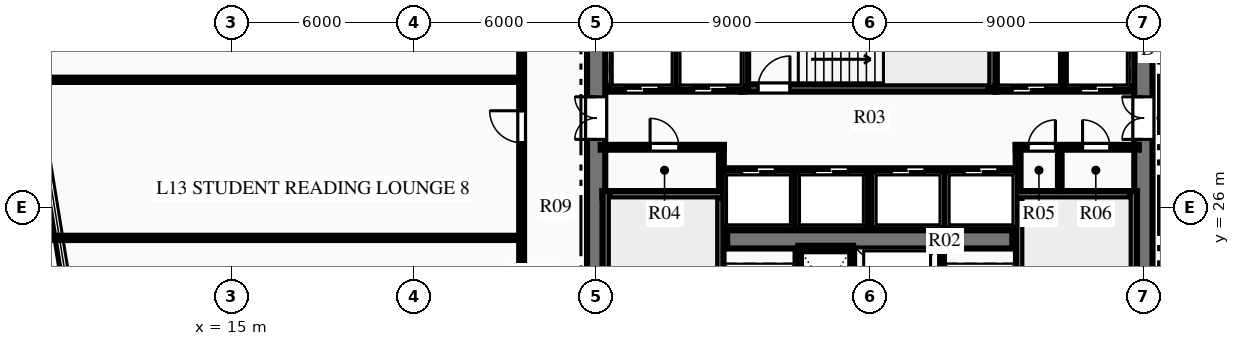
"""IFC4 building model, lengths in metres.
Left out: names, types, materials, properties, quantities, classifications, styles, units other than length and angle.
Written with IfcOpenShell. Run it as: python <this file> out.ifc"""

import sys

from ifc_helpers import new_model, si_unit, direction, frame, frame_2d, origin, place, context, subcontext, project, spatial, rectangle, extrude, element, fill, save


model = new_model("IFC4")
c1 = context("Model", 3, precision=1e-05, world=origin(), true_north=direction((0.0, 1.0)))
c2 = subcontext(c1, "Body", "Model", "MODEL_VIEW")
j1 = project(units=[si_unit("LENGTHUNIT", "METRE"), si_unit("PLANEANGLEUNIT", "RADIAN")], contexts=[c1])
p1 = place(None, origin())
s1 = spatial("IfcSite", under=j1, at=p1, CompositionType="ELEMENT")
p2 = place(p1, origin())
s2 = spatial("IfcBuilding", under=s1, at=p2, CompositionType="ELEMENT")
p3 = place(p2, frame((0.0, 0.0, 58.95)))
s3 = spatial("IfcBuildingStorey", under=s2, at=p3, CompositionType="ELEMENT", Elevation=58.95)
p4 = place(p3, frame((27.0, 18.3, 0.0), z_axis=(0.0, 0.0, 1.0), x_axis=(0.0, 1.0, 0.0)))
e1 = element("IfcWall", 1, at=p4, inside=s3, PredefinedType="SHEAR", context=c2, shape_type="SweptSolid", body=[
    extrude(rectangle(XDim=15.4, YDim=0.6, at=frame_2d((7.7, 0.0))), origin(), (0.0, 0.0, 1.0), 3.75),
])
p5 = place(p4, frame((9.94, 0.0, 0.0)))
e2 = element("IfcOpeningElement", 2, at=p5, cuts=e1, PredefinedType="OPENING", context=c2, shape_type="SweptSolid", body=[
    extrude(rectangle(XDim=1.4, YDim=2.2, at=frame_2d((0.7, 1.1))), frame((0.0, 0.31, 0.0), z_axis=(0.0, -1.0, 0.0), x_axis=(1.0, 0.0, 0.0)), (0.0, 0.0, 1.0), 0.62),
])
p6 = place(p3, frame((45.0, 18.3, 0.0), z_axis=(0.0, 0.0, 1.0), x_axis=(0.0, 1.0, 0.0)))
e3 = element("IfcWall", 3, at=p6, inside=s3, PredefinedType="SHEAR", context=c2, shape_type="SweptSolid", body=[
    extrude(rectangle(XDim=15.4, YDim=0.6, at=frame_2d((7.7, 0.0))), origin(), (0.0, 0.0, 1.0), 3.75),
])
p7 = place(p6, frame((9.94, 0.0, 0.0)))
e4 = element("IfcOpeningElement", 4, at=p7, cuts=e3, PredefinedType="OPENING", context=c2, shape_type="SweptSolid", body=[
    extrude(rectangle(XDim=1.4, YDim=2.2, at=frame_2d((0.7, 1.1))), frame((0.0, 0.31, 0.0), z_axis=(0.0, -1.0, 0.0), x_axis=(1.0, 0.0, 0.0)), (0.0, 0.0, 1.0), 0.62),
])
p8 = place(p3, frame((31.31, 24.95, 0.0), z_axis=(0.0, 0.0, 1.0), x_axis=(1.0, 0.0, 0.0)))
e5 = element("IfcWall", 5, at=p8, inside=s3, PredefinedType="SHEAR", context=c2, shape_type="SweptSolid", body=[
    extrude(rectangle(XDim=9.38, YDim=0.6, at=frame_2d((4.69, 0.0))), origin(), (0.0, 0.0, 1.0), 3.75),
])
p9 = place(p3, frame((31.07, 18.28, 0.0), z_axis=(0.0, 0.0, 1.0), x_axis=(0.0, 1.0, 0.0)))
e6 = element("IfcWall", 6, at=p9, inside=s3, PredefinedType="SHEAR", context=c2, shape_type="SweptSolid", body=[
    extrude(rectangle(XDim=8.26, YDim=0.24, at=frame_2d((4.13, 0.0))), origin(), (0.0, 0.0, 1.0), 3.75),
])
p10 = place(p9, frame((0.365, 0.0, 0.0)))
e7 = element("IfcOpeningElement", 7, at=p10, cuts=e6, PredefinedType="OPENING", context=c2, shape_type="SweptSolid", body=[
    extrude(rectangle(XDim=1.05, YDim=2.15, at=frame_2d((0.525, 1.075))), frame((0.0, 0.13, 0.0), z_axis=(0.0, -1.0, 0.0), x_axis=(1.0, 0.0, 0.0)), (0.0, 0.0, 1.0), 0.26),
])
p11 = place(p3, frame((27.21, 26.42, 0.0), z_axis=(0.0, 0.0, 1.0), x_axis=(1.0, 0.0, 0.0)))
e8 = element("IfcWall", 8, at=p11, inside=s3, PredefinedType="SHEAR", context=c2, shape_type="SweptSolid", body=[
    extrude(rectangle(XDim=3.98, YDim=0.24, at=frame_2d((1.99, 0.0))), origin(), (0.0, 0.0, 1.0), 3.75),
])
p12 = place(p3, frame((27.33, 18.28, 0.0), z_axis=(0.0, 0.0, 1.0), x_axis=(0.0, 1.0, 0.0)))
e9 = element("IfcWall", 9, at=p12, inside=s3, PredefinedType="SHEAR", context=c2, shape_type="SweptSolid", body=[
    extrude(rectangle(XDim=8.26, YDim=0.24, at=frame_2d((4.13, 0.0))), origin(), (0.0, 0.0, 1.0), 3.75),
])
p13 = place(p3, frame((40.93, 18.28, 0.0), z_axis=(0.0, 0.0, 1.0), x_axis=(0.0, 1.0, 0.0)))
e10 = element("IfcWall", 10, at=p13, inside=s3, PredefinedType="SHEAR", context=c2, shape_type="SweptSolid", body=[
    extrude(rectangle(XDim=8.26, YDim=0.24, at=frame_2d((4.13, 0.0))), origin(), (0.0, 0.0, 1.0), 3.75),
])
p14 = place(p13, frame((0.365, 0.0, 0.0)))
e11 = element("IfcOpeningElement", 11, at=p14, cuts=e10, PredefinedType="OPENING", context=c2, shape_type="SweptSolid", body=[
    extrude(rectangle(XDim=1.05, YDim=2.15, at=frame_2d((0.525, 1.075))), frame((0.0, 0.13, 0.0), z_axis=(0.0, -1.0, 0.0), x_axis=(1.0, 0.0, 0.0)), (0.0, 0.0, 1.0), 0.26),
])
p15 = place(p3, frame((40.81, 26.42, 0.0), z_axis=(0.0, 0.0, 1.0), x_axis=(1.0, 0.0, 0.0)))
e12 = element("IfcWall", 12, at=p15, inside=s3, PredefinedType="SHEAR", context=c2, shape_type="SweptSolid", body=[
    extrude(rectangle(XDim=3.98, YDim=0.24, at=frame_2d((1.99, 0.0))), origin(), (0.0, 0.0, 1.0), 3.75),
])
p16 = place(p3, frame((44.67, 18.28, 0.0), z_axis=(0.0, 0.0, 1.0), x_axis=(0.0, 1.0, 0.0)))
e13 = element("IfcWall", 13, at=p16, inside=s3, PredefinedType="SHEAR", context=c2, shape_type="SweptSolid", body=[
    extrude(rectangle(XDim=8.26, YDim=0.24, at=frame_2d((4.13, 0.0))), origin(), (0.0, 0.0, 1.0), 3.75),
])
p17 = place(p3, frame((31.76, 29.93, 0.0), z_axis=(0.0, 0.0, 1.0), x_axis=(1.0, 0.0, 0.0)))
e14 = element("IfcWall", 14, at=p17, inside=s3, PredefinedType="SHEAR", context=c2, shape_type="SweptSolid", body=[
    extrude(rectangle(XDim=8.38, YDim=0.24, at=frame_2d((4.19, 0.0))), origin(), (0.0, 0.0, 1.0), 3.75),
])
p18 = place(p17, frame((0.565, 0.0, 0.0)))
e15 = element("IfcOpeningElement", 15, at=p18, cuts=e14, PredefinedType="OPENING", context=c2, shape_type="SweptSolid", body=[
    extrude(rectangle(XDim=1.05, YDim=2.15, at=frame_2d((0.525, 1.075))), frame((0.0, 0.13, 0.0), z_axis=(0.0, -1.0, 0.0), x_axis=(1.0, 0.0, 0.0)), (0.0, 0.0, 1.0), 0.26),
])
p19 = place(p3, frame((31.88, 29.93, 0.0), z_axis=(0.0, 0.0, 1.0), x_axis=(0.0, 1.0, 0.0)))
e16 = element("IfcWall", 16, at=p19, inside=s3, PredefinedType="SHEAR", context=c2, shape_type="SweptSolid", body=[
    extrude(rectangle(XDim=3.79, YDim=0.24, at=frame_2d((1.895, 0.0))), origin(), (0.0, 0.0, 1.0), 3.75),
])
p20 = place(p3, frame((40.02, 29.93, 0.0), z_axis=(0.0, 0.0, 1.0), x_axis=(0.0, 1.0, 0.0)))
e17 = element("IfcWall", 17, at=p20, inside=s3, PredefinedType="SHEAR", context=c2, shape_type="SweptSolid", body=[
    extrude(rectangle(XDim=3.85, YDim=0.24, at=frame_2d((1.925, 0.0))), origin(), (0.0, 0.0, 1.0), 3.75),
])
for number, where, z_axis, x_axis in (
    (18, (33.65, 22.05, 0.0), (0.0, 0.0, 1.0), (0.0, 1.0, 0.0)),
    (19, (35.45, 22.05, 0.0), (0.0, 0.0, 1.0), (0.0, 1.0, 0.0)),
):
    element("IfcWall", number, at=place(p3, frame(where, z_axis=z_axis, x_axis=x_axis)), inside=s3, PredefinedType="PARTITIONING", context=c2, shape_type="SweptSolid", body=[
        extrude(rectangle(XDim=2.6, YDim=0.18, at=frame_2d((1.3, 0.0))), origin(), (0.0, 0.0, 1.0), 3.44),
    ])
p21 = place(p3, frame((33.65, 24.65, 0.0), z_axis=(0.0, 0.0, 1.0), x_axis=(1.0, 0.0, 0.0)))
e20 = element("IfcWall", 20, at=p21, inside=s3, PredefinedType="PARTITIONING", context=c2, shape_type="SweptSolid", body=[
    extrude(rectangle(XDim=1.8, YDim=0.18, at=frame_2d((0.9, 0.0))), origin(), (0.0, 0.0, 1.0), 3.44),
])
p22 = place(p3, frame((38.35, 22.05, 0.0), z_axis=(0.0, 0.0, 1.0), x_axis=(0.0, 1.0, 0.0)))
e21 = element("IfcWall", 21, at=p22, inside=s3, PredefinedType="PARTITIONING", context=c2, shape_type="SweptSolid", body=[
    extrude(rectangle(XDim=2.6, YDim=0.18, at=frame_2d((1.3, 0.0))), origin(), (0.0, 0.0, 1.0), 3.44),
])
p23 = place(p3, frame((27.15, 27.98, 0.0), z_axis=(0.0, 0.0, 1.0), x_axis=(1.0, 0.0, 0.0)))
e22 = element("IfcWall", 22, at=p23, inside=s3, PredefinedType="PARTITIONING", context=c2, shape_type="SweptSolid", body=[
    extrude(rectangle(XDim=4.05, YDim=0.16, at=frame_2d((2.025, 0.0))), origin(), (0.0, 0.0, 1.0), 3.44),
])
p24 = place(p23, frame((1.625, 0.0, 0.0)))
e23 = element("IfcOpeningElement", 23, at=p24, cuts=e22, PredefinedType="OPENING", context=c2, shape_type="SweptSolid", body=[
    extrude(rectangle(XDim=0.95, YDim=2.15, at=frame_2d((0.475, 1.075))), frame((0.0, 0.09, 0.0), z_axis=(0.0, -1.0, 0.0), x_axis=(1.0, 0.0, 0.0)), (0.0, 0.0, 1.0), 0.18),
])
p25 = place(p3, frame((31.12, 26.54, 0.0), z_axis=(0.0, 0.0, 1.0), x_axis=(0.0, 1.0, 0.0)))
e24 = element("IfcWall", 24, at=p25, inside=s3, PredefinedType="PARTITIONING", context=c2, shape_type="SweptSolid", body=[
    extrude(rectangle(XDim=1.51, YDim=0.16, at=frame_2d((0.755, 0.0))), origin(), (0.0, 0.0, 1.0), 3.44),
])
p26 = place(p3, frame((40.8, 27.98, 0.0), z_axis=(0.0, 0.0, 1.0), x_axis=(1.0, 0.0, 0.0)))
e25 = element("IfcWall", 25, at=p26, inside=s3, PredefinedType="PARTITIONING", context=c2, shape_type="SweptSolid", body=[
    extrude(rectangle(XDim=4.05, YDim=0.16, at=frame_2d((2.025, 0.0))), origin(), (0.0, 0.0, 1.0), 3.44),
])
p27 = place(p26, frame((0.407, 0.0, 0.0)))
e26 = element("IfcOpeningElement", 26, at=p27, cuts=e25, PredefinedType="OPENING", context=c2, shape_type="SweptSolid", body=[
    extrude(rectangle(XDim=0.9, YDim=2.15, at=frame_2d((0.45, 1.075))), frame((0.0, 0.09, 0.0), z_axis=(0.0, -1.0, 0.0), x_axis=(1.0, 0.0, 0.0)), (0.0, 0.0, 1.0), 0.18),
])
p28 = place(p26, frame((2.2, 0.0, 0.0)))
e27 = element("IfcOpeningElement", 27, at=p28, cuts=e25, PredefinedType="OPENING", context=c2, shape_type="SweptSolid", body=[
    extrude(rectangle(XDim=0.9, YDim=2.15, at=frame_2d((0.45, 1.075))), frame((0.0, 0.09, 0.0), z_axis=(0.0, -1.0, 0.0), x_axis=(1.0, 0.0, 0.0)), (0.0, 0.0, 1.0), 0.18),
])
p29 = place(p3, frame((40.88, 26.54, 0.0), z_axis=(0.0, 0.0, 1.0), x_axis=(0.0, 1.0, 0.0)))
e28 = element("IfcWall", 28, at=p29, inside=s3, PredefinedType="PARTITIONING", context=c2, shape_type="SweptSolid", body=[
    extrude(rectangle(XDim=1.51, YDim=0.16, at=frame_2d((0.755, 0.0))), origin(), (0.0, 0.0, 1.0), 3.44),
])
p30 = place(p3, frame((42.25, 26.54, 0.0), z_axis=(0.0, 0.0, 1.0), x_axis=(0.0, 1.0, 0.0)))
e29 = element("IfcWall", 29, at=p30, inside=s3, PredefinedType="PARTITIONING", context=c2, shape_type="SweptSolid", body=[
    extrude(rectangle(XDim=1.44, YDim=0.12, at=frame_2d((0.72, 0.0))), origin(), (0.0, 0.0, 1.0), 3.44),
])
p31 = place(p3, frame((27.45, 29.9, 0.0), z_axis=(0.0, 0.0, 1.0), x_axis=(1.0, 0.0, 0.0)))
e30 = element("IfcWall", 30, at=p31, inside=s3, PredefinedType="PARTITIONING", context=c2, shape_type="SweptSolid", body=[
    extrude(rectangle(XDim=4.43, YDim=0.18, at=frame_2d((2.215, 0.0))), origin(), (0.0, 0.0, 1.0), 3.44),
])
p32 = place(p31, frame((0.515, 0.0, 0.0)))
e31 = element("IfcOpeningElement", 31, at=p32, cuts=e30, PredefinedType="OPENING", context=c2, shape_type="SweptSolid", body=[
    extrude(rectangle(XDim=1.1, YDim=2.15, at=frame_2d((0.55, 1.075))), frame((0.0, 0.1, 0.0), z_axis=(0.0, -1.0, 0.0), x_axis=(1.0, 0.0, 0.0)), (0.0, 0.0, 1.0), 0.2),
])
p33 = place(p31, frame((2.765, 0.0, 0.0)))
e32 = element("IfcOpeningElement", 32, at=p33, cuts=e30, PredefinedType="OPENING", context=c2, shape_type="SweptSolid", body=[
    extrude(rectangle(XDim=1.1, YDim=2.15, at=frame_2d((0.55, 1.075))), frame((0.0, 0.1, 0.0), z_axis=(0.0, -1.0, 0.0), x_axis=(1.0, 0.0, 0.0)), (0.0, 0.0, 1.0), 0.2),
])
p34 = place(p3, frame((29.63, 29.9, 0.0), z_axis=(0.0, 0.0, 1.0), x_axis=(0.0, 1.0, 0.0)))
e33 = element("IfcWall", 33, at=p34, inside=s3, PredefinedType="PARTITIONING", context=c2, shape_type="SweptSolid", body=[
    extrude(rectangle(XDim=3.75, YDim=0.18, at=frame_2d((1.875, 0.0))), origin(), (0.0, 0.0, 1.0), 3.44),
])
p35 = place(p3, frame((40.12, 29.9, 0.0), z_axis=(0.0, 0.0, 1.0), x_axis=(1.0, 0.0, 0.0)))
e34 = element("IfcWall", 34, at=p35, inside=s3, PredefinedType="PARTITIONING", context=c2, shape_type="SweptSolid", body=[
    extrude(rectangle(XDim=4.43, YDim=0.18, at=frame_2d((2.215, 0.0))), origin(), (0.0, 0.0, 1.0), 3.44),
])
p36 = place(p35, frame((0.565, 0.0, 0.0)))
e35 = element("IfcOpeningElement", 35, at=p36, cuts=e34, PredefinedType="OPENING", context=c2, shape_type="SweptSolid", body=[
    extrude(rectangle(XDim=1.1, YDim=2.15, at=frame_2d((0.55, 1.075))), frame((0.0, 0.1, 0.0), z_axis=(0.0, -1.0, 0.0), x_axis=(1.0, 0.0, 0.0)), (0.0, 0.0, 1.0), 0.2),
])
p37 = place(p35, frame((2.815, 0.0, 0.0)))
e36 = element("IfcOpeningElement", 36, at=p37, cuts=e34, PredefinedType="OPENING", context=c2, shape_type="SweptSolid", body=[
    extrude(rectangle(XDim=1.1, YDim=2.15, at=frame_2d((0.55, 1.075))), frame((0.0, 0.1, 0.0), z_axis=(0.0, -1.0, 0.0), x_axis=(1.0, 0.0, 0.0)), (0.0, 0.0, 1.0), 0.2),
])
p38 = place(p3, frame((42.37, 29.9, 0.0), z_axis=(0.0, 0.0, 1.0), x_axis=(0.0, 1.0, 0.0)))
e37 = element("IfcWall", 37, at=p38, inside=s3, PredefinedType="PARTITIONING", context=c2, shape_type="SweptSolid", body=[
    extrude(rectangle(XDim=3.75, YDim=0.18, at=frame_2d((1.875, 0.0))), origin(), (0.0, 0.0, 1.0), 3.44),
])
p39 = place(p3, frame((31.2, 27.2, 0.0), z_axis=(0.0, 0.0, 1.0), x_axis=(1.0, 0.0, 0.0)))
e38 = element("IfcWall", 38, at=p39, inside=s3, PredefinedType="PARTITIONING", context=c2, shape_type="SweptSolid", body=[
    extrude(rectangle(XDim=9.6, YDim=0.18, at=frame_2d((4.8, 0.0))), origin(), (0.0, 0.0, 1.0), 3.44),
])
p40 = place(p39, frame((0.59, 0.0, 0.0)))
e39 = element("IfcOpeningElement", 39, at=p40, cuts=e38, PredefinedType="OPENING", context=c2, shape_type="SweptSolid", body=[
    extrude(rectangle(XDim=1.1, YDim=2.15, at=frame_2d((0.55, 1.075))), frame((0.0, 0.1, 0.0), z_axis=(0.0, -1.0, 0.0), x_axis=(1.0, 0.0, 0.0)), (0.0, 0.0, 1.0), 0.2),
])
p41 = place(p39, frame((2.99, 0.0, 0.0)))
e40 = element("IfcOpeningElement", 40, at=p41, cuts=e38, PredefinedType="OPENING", context=c2, shape_type="SweptSolid", body=[
    extrude(rectangle(XDim=1.1, YDim=2.15, at=frame_2d((0.55, 1.075))), frame((0.0, 0.1, 0.0), z_axis=(0.0, -1.0, 0.0), x_axis=(1.0, 0.0, 0.0)), (0.0, 0.0, 1.0), 0.2),
])
p42 = place(p39, frame((5.51, 0.0, 0.0)))
e41 = element("IfcOpeningElement", 41, at=p42, cuts=e38, PredefinedType="OPENING", context=c2, shape_type="SweptSolid", body=[
    extrude(rectangle(XDim=1.1, YDim=2.15, at=frame_2d((0.55, 1.075))), frame((0.0, 0.1, 0.0), z_axis=(0.0, -1.0, 0.0), x_axis=(1.0, 0.0, 0.0)), (0.0, 0.0, 1.0), 0.2),
])
p43 = place(p39, frame((7.91, 0.0, 0.0)))
e42 = element("IfcOpeningElement", 42, at=p43, cuts=e38, PredefinedType="OPENING", context=c2, shape_type="SweptSolid", body=[
    extrude(rectangle(XDim=1.1, YDim=2.15, at=frame_2d((0.55, 1.075))), frame((0.0, 0.1, 0.0), z_axis=(0.0, -1.0, 0.0), x_axis=(1.0, 0.0, 0.0)), (0.0, 0.0, 1.0), 0.2),
])
for number, where, z_axis, x_axis in (
    (43, (33.54, 25.3, 0.0), (0.0, 0.0, 1.0), (0.0, 1.0, 0.0)),
    (44, (36.0, 25.3, 0.0), (0.0, 0.0, 1.0), (0.0, 1.0, 0.0)),
    (45, (38.46, 25.3, 0.0), (0.0, 0.0, 1.0), (0.0, 1.0, 0.0)),
):
    element("IfcWall", number, at=place(p3, frame(where, z_axis=z_axis, x_axis=x_axis)), inside=s3, PredefinedType="PARTITIONING", context=c2, shape_type="SweptSolid", body=[
        extrude(rectangle(XDim=1.9, YDim=0.18, at=frame_2d((0.95, 0.0))), origin(), (0.0, 0.0, 1.0), 3.44),
    ])
p44 = place(p3, frame((24.55, 15.55, 0.0), z_axis=(0.0, 0.0, 1.0), x_axis=(0.0, 1.0, 0.0)))
e46 = element("IfcWall", 46, at=p44, inside=s3, PredefinedType="PARTITIONING", context=c2, shape_type="SweptSolid", body=[
    extrude(rectangle(XDim=20.9, YDim=0.16, at=frame_2d((10.45, 0.0))), origin(), (0.0, 0.0, 1.0), 3.44),
])
p45 = place(p44, frame((1.866, 0.0, 0.0)))
e47 = element("IfcOpeningElement", 47, at=p45, cuts=e46, PredefinedType="OPENING", context=c2, shape_type="SweptSolid", body=[
    extrude(rectangle(XDim=1.05, YDim=2.15, at=frame_2d((0.525, 1.075))), frame((0.0, 0.09, 0.0), z_axis=(0.0, -1.0, 0.0), x_axis=(1.0, 0.0, 0.0)), (0.0, 0.0, 1.0), 0.18),
])
p46 = place(p44, frame((5.405, 0.0, 0.0)))
e48 = element("IfcOpeningElement", 48, at=p46, cuts=e46, PredefinedType="OPENING", context=c2, shape_type="SweptSolid", body=[
    extrude(rectangle(XDim=1.05, YDim=2.15, at=frame_2d((0.525, 1.075))), frame((0.0, 0.09, 0.0), z_axis=(0.0, -1.0, 0.0), x_axis=(1.0, 0.0, 0.0)), (0.0, 0.0, 1.0), 0.18),
])
p47 = place(p44, frame((12.581, 0.0, 0.0)))
e49 = element("IfcOpeningElement", 49, at=p47, cuts=e46, PredefinedType="OPENING", context=c2, shape_type="SweptSolid", body=[
    extrude(rectangle(XDim=1.05, YDim=2.15, at=frame_2d((0.525, 1.075))), frame((0.0, 0.09, 0.0), z_axis=(0.0, -1.0, 0.0), x_axis=(1.0, 0.0, 0.0)), (0.0, 0.0, 1.0), 0.18),
])
p48 = place(p44, frame((15.899, 0.0, 0.0)))
e50 = element("IfcOpeningElement", 50, at=p48, cuts=e46, PredefinedType="OPENING", context=c2, shape_type="SweptSolid", body=[
    extrude(rectangle(XDim=1.05, YDim=2.15, at=frame_2d((0.525, 1.075))), frame((0.0, 0.09, 0.0), z_axis=(0.0, -1.0, 0.0), x_axis=(1.0, 0.0, 0.0)), (0.0, 0.0, 1.0), 0.18),
])
p49 = place(p3, frame((9.205, 25.0, 0.0), z_axis=(0.0, 0.0, 1.0), x_axis=(1.0, 0.0, 0.0)))
e51 = element("IfcWall", 51, at=p49, inside=s3, PredefinedType="PARTITIONING", context=c2, shape_type="SweptSolid", body=[
    extrude(rectangle(XDim=15.345, YDim=0.14, at=frame_2d((7.672, 0.0))), origin(), (0.0, 0.0, 1.0), 3.44),
])
p50 = place(p3, frame((8.363, 30.2, 0.0), z_axis=(0.0, 0.0, 1.0), x_axis=(1.0, 0.0, 0.0)))
e52 = element("IfcWall", 52, at=p50, inside=s3, PredefinedType="PARTITIONING", context=c2, shape_type="SweptSolid", body=[
    extrude(rectangle(XDim=16.187, YDim=0.14, at=frame_2d((8.094, 0.0))), origin(), (0.0, 0.0, 1.0), 3.44),
])
p51 = place(p24, origin())
e53 = element("IfcDoor", 53, at=p51, inside=s3, OperationType="SINGLE_SWING_LEFT", PredefinedType="DOOR", context=c2, shape_type="SweptSolid", body=[
    extrude(rectangle(XDim=0.95, YDim=2.15, at=frame_2d((0.475, 1.075))), frame((0.0, 0.025, 0.0), z_axis=(0.0, -1.0, 0.0), x_axis=(1.0, 0.0, 0.0)), (0.0, 0.0, 1.0), 0.05),
])
fill(e23, e53)
p52 = place(p27, origin())
e54 = element("IfcDoor", 54, at=p52, inside=s3, OperationType="SINGLE_SWING_RIGHT", PredefinedType="DOOR", context=c2, shape_type="SweptSolid", body=[
    extrude(rectangle(XDim=0.9, YDim=2.15, at=frame_2d((0.45, 1.075))), frame((0.0, 0.025, 0.0), z_axis=(0.0, -1.0, 0.0), x_axis=(1.0, 0.0, 0.0)), (0.0, 0.0, 1.0), 0.05),
])
fill(e26, e54)
p53 = place(p28, origin())
e55 = element("IfcDoor", 55, at=p53, inside=s3, OperationType="SINGLE_SWING_LEFT", PredefinedType="DOOR", context=c2, shape_type="SweptSolid", body=[
    extrude(rectangle(XDim=0.9, YDim=2.15, at=frame_2d((0.45, 1.075))), frame((0.0, 0.025, 0.0), z_axis=(0.0, -1.0, 0.0), x_axis=(1.0, 0.0, 0.0)), (0.0, 0.0, 1.0), 0.05),
])
fill(e27, e55)
p54 = place(p18, origin())
e56 = element("IfcDoor", 56, at=p54, inside=s3, OperationType="SINGLE_SWING_RIGHT", PredefinedType="DOOR", context=c2, shape_type="SweptSolid", body=[
    extrude(rectangle(XDim=1.05, YDim=2.15, at=frame_2d((0.525, 1.075))), frame((0.0, 0.025, 0.0), z_axis=(0.0, -1.0, 0.0), x_axis=(1.0, 0.0, 0.0)), (0.0, 0.0, 1.0), 0.05),
])
fill(e15, e56)
p55 = place(p5, origin())
e57 = element("IfcDoor", 57, at=p55, inside=s3, OperationType="DOUBLE_DOOR_SINGLE_SWING", PredefinedType="DOOR", context=c2, shape_type="SweptSolid", body=[
    extrude(rectangle(XDim=1.4, YDim=2.2, at=frame_2d((0.7, 1.1))), frame((0.0, 0.025, 0.0), z_axis=(0.0, -1.0, 0.0), x_axis=(1.0, 0.0, 0.0)), (0.0, 0.0, 1.0), 0.05),
])
fill(e2, e57)
p56 = place(p7, origin())
e58 = element("IfcDoor", 58, at=p56, inside=s3, OperationType="DOUBLE_DOOR_SINGLE_SWING", PredefinedType="DOOR", context=c2, shape_type="SweptSolid", body=[
    extrude(rectangle(XDim=1.4, YDim=2.2, at=frame_2d((0.7, 1.1))), frame((0.0, 0.025, 0.0), z_axis=(0.0, -1.0, 0.0), x_axis=(1.0, 0.0, 0.0)), (0.0, 0.0, 1.0), 0.05),
])
fill(e4, e58)
p57 = place(p47, origin())
e59 = element("IfcDoor", 59, at=p57, inside=s3, OperationType="SINGLE_SWING_RIGHT", PredefinedType="DOOR", context=c2, shape_type="SweptSolid", body=[
    extrude(rectangle(XDim=1.05, YDim=2.15, at=frame_2d((0.525, 1.075))), frame((0.0, 0.025, 0.0), z_axis=(0.0, -1.0, 0.0), x_axis=(1.0, 0.0, 0.0)), (0.0, 0.0, 1.0), 0.05),
])
fill(e49, e59)
p58 = place(p32, origin())
e60 = element("IfcDoor", 60, at=p58, inside=s3, OperationType="SLIDING_TO_LEFT", PredefinedType="DOOR", context=c2, shape_type="SweptSolid", body=[
    extrude(rectangle(XDim=1.1, YDim=2.15, at=frame_2d((0.55, 1.075))), frame((0.0, 0.025, 0.0), z_axis=(0.0, -1.0, 0.0), x_axis=(1.0, 0.0, 0.0)), (0.0, 0.0, 1.0), 0.05),
])
fill(e31, e60)
p59 = place(p33, origin())
e61 = element("IfcDoor", 61, at=p59, inside=s3, OperationType="SLIDING_TO_LEFT", PredefinedType="DOOR", context=c2, shape_type="SweptSolid", body=[
    extrude(rectangle(XDim=1.1, YDim=2.15, at=frame_2d((0.55, 1.075))), frame((0.0, 0.025, 0.0), z_axis=(0.0, -1.0, 0.0), x_axis=(1.0, 0.0, 0.0)), (0.0, 0.0, 1.0), 0.05),
])
fill(e32, e61)
p60 = place(p36, origin())
e62 = element("IfcDoor", 62, at=p60, inside=s3, OperationType="SLIDING_TO_LEFT", PredefinedType="DOOR", context=c2, shape_type="SweptSolid", body=[
    extrude(rectangle(XDim=1.1, YDim=2.15, at=frame_2d((0.55, 1.075))), frame((0.0, 0.025, 0.0), z_axis=(0.0, -1.0, 0.0), x_axis=(1.0, 0.0, 0.0)), (0.0, 0.0, 1.0), 0.05),
])
fill(e35, e62)
p61 = place(p37, origin())
e63 = element("IfcDoor", 63, at=p61, inside=s3, OperationType="SLIDING_TO_LEFT", PredefinedType="DOOR", context=c2, shape_type="SweptSolid", body=[
    extrude(rectangle(XDim=1.1, YDim=2.15, at=frame_2d((0.55, 1.075))), frame((0.0, 0.025, 0.0), z_axis=(0.0, -1.0, 0.0), x_axis=(1.0, 0.0, 0.0)), (0.0, 0.0, 1.0), 0.05),
])
fill(e36, e63)
p62 = place(p40, origin())
e64 = element("IfcDoor", 64, at=p62, inside=s3, OperationType="SLIDING_TO_LEFT", PredefinedType="DOOR", context=c2, shape_type="SweptSolid", body=[
    extrude(rectangle(XDim=1.1, YDim=2.15, at=frame_2d((0.55, 1.075))), frame((0.0, 0.025, 0.0), z_axis=(0.0, -1.0, 0.0), x_axis=(1.0, 0.0, 0.0)), (0.0, 0.0, 1.0), 0.05),
])
fill(e39, e64)
p63 = place(p41, origin())
e65 = element("IfcDoor", 65, at=p63, inside=s3, OperationType="SLIDING_TO_LEFT", PredefinedType="DOOR", context=c2, shape_type="SweptSolid", body=[
    extrude(rectangle(XDim=1.1, YDim=2.15, at=frame_2d((0.55, 1.075))), frame((0.0, 0.025, 0.0), z_axis=(0.0, -1.0, 0.0), x_axis=(1.0, 0.0, 0.0)), (0.0, 0.0, 1.0), 0.05),
])
fill(e40, e65)
p64 = place(p42, origin())
e66 = element("IfcDoor", 66, at=p64, inside=s3, OperationType="SLIDING_TO_LEFT", PredefinedType="DOOR", context=c2, shape_type="SweptSolid", body=[
    extrude(rectangle(XDim=1.1, YDim=2.15, at=frame_2d((0.55, 1.075))), frame((0.0, 0.025, 0.0), z_axis=(0.0, -1.0, 0.0), x_axis=(1.0, 0.0, 0.0)), (0.0, 0.0, 1.0), 0.05),
])
fill(e41, e66)
p65 = place(p43, origin())
e67 = element("IfcDoor", 67, at=p65, inside=s3, OperationType="SLIDING_TO_LEFT", PredefinedType="DOOR", context=c2, shape_type="SweptSolid", body=[
    extrude(rectangle(XDim=1.1, YDim=2.15, at=frame_2d((0.55, 1.075))), frame((0.0, 0.025, 0.0), z_axis=(0.0, -1.0, 0.0), x_axis=(1.0, 0.0, 0.0)), (0.0, 0.0, 1.0), 0.05),
])
fill(e42, e67)
save(model, sys.argv[1])
